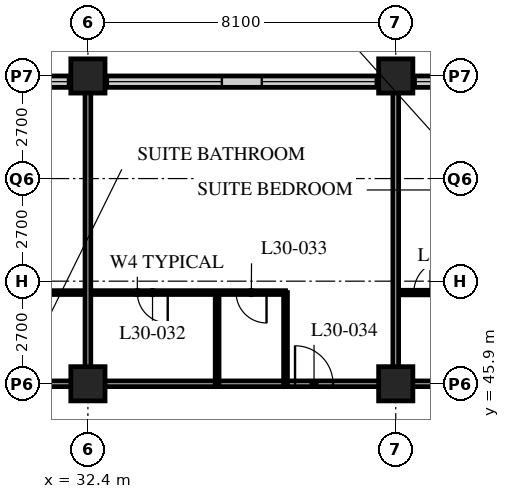
"""IFC4 building model, lengths in metres.
Left out: names, types, materials, properties, quantities, classifications, styles, units other than length and angle.
Written with IfcOpenShell. Run it as: python <this file> out.ifc"""

import sys

from ifc_helpers import new_model, si_unit, direction, frame, frame_2d, origin, origin_2d, place, context, subcontext, project, spatial, rectangle, hollow_rectangle, extrude, element, fill, save


model = new_model("IFC4")
c1 = context("Model", 3, precision=1e-05, world=origin(), true_north=direction((0.0, 1.0)))
c2 = subcontext(c1, "Body", "Model", "MODEL_VIEW")
j1 = project(units=[si_unit("LENGTHUNIT", "METRE"), si_unit("PLANEANGLEUNIT", "RADIAN")], contexts=[c1])
p1 = place(None, origin())
s1 = spatial("IfcSite", under=j1, at=p1, CompositionType="ELEMENT")
p2 = place(p1, origin())
s2 = spatial("IfcBuilding", under=s1, at=p2, CompositionType="ELEMENT")
p3 = place(p2, frame((0.0, 0.0, 120.4)))
s3 = spatial("IfcBuildingStorey", under=s2, at=p3, CompositionType="ELEMENT", Elevation=120.4)
for number, where, z_axis, x_axis in (
    (1, (32.4, 45.9, 0.0), (0.0, 0.0, 1.0), (1.0, 0.0, 0.0)),
    (2, (32.4, 54.0, 0.0), (0.0, 0.0, 1.0), (1.0, 0.0, 0.0)),
    (3, (40.5, 45.9, 0.0), (0.0, 0.0, 1.0), (1.0, 0.0, 0.0)),
    (4, (40.5, 54.0, 0.0), (0.0, 0.0, 1.0), (1.0, 0.0, 0.0)),
):
    element("IfcColumn", number, at=place(p3, frame(where, z_axis=z_axis, x_axis=x_axis)), inside=s3, PredefinedType="COLUMN", context=c2, shape_type="SweptSolid", body=[
        extrude(hollow_rectangle(XDim=0.9, YDim=0.9, WallThickness=0.09, at=origin_2d()), origin(), (0.0, 0.0, 1.0), 3.4),
    ])
p4 = place(p3, frame((48.3, 53.85, 0.0), z_axis=(0.0, 0.0, 1.0), x_axis=(-1.0, 0.0, 0.0)))
e5 = element("IfcWall", 5, at=p4, inside=s3, PredefinedType="SOLIDWALL", context=c2, shape_type="SweptSolid", body=[
    extrude(rectangle(XDim=40.2, YDim=0.3, at=frame_2d((20.1, 0.0))), origin(), (0.0, 0.0, 1.0), 3.19),
])
p5 = place(p4, frame((0.225, 0.0, 0.9)))
e6 = element("IfcOpeningElement", 6, at=p5, cuts=e5, PredefinedType="OPENING", context=c2, shape_type="SweptSolid", body=[
    extrude(rectangle(XDim=3.0, YDim=2.0, at=frame_2d((1.5, 1.0))), frame((0.0, 0.16, 0.0), z_axis=(0.0, -1.0, 0.0), x_axis=(1.0, 0.0, 0.0)), (0.0, 0.0, 1.0), 0.32),
])
p6 = place(p4, frame((4.275, 0.0, 0.9)))
e7 = element("IfcOpeningElement", 7, at=p6, cuts=e5, PredefinedType="OPENING", context=c2, shape_type="SweptSolid", body=[
    extrude(rectangle(XDim=3.0, YDim=2.0, at=frame_2d((1.5, 1.0))), frame((0.0, 0.16, 0.0), z_axis=(0.0, -1.0, 0.0), x_axis=(1.0, 0.0, 0.0)), (0.0, 0.0, 1.0), 0.32),
])
p7 = place(p4, frame((8.325, 0.0, 0.9)))
e8 = element("IfcOpeningElement", 8, at=p7, cuts=e5, PredefinedType="OPENING", context=c2, shape_type="SweptSolid", body=[
    extrude(rectangle(XDim=3.0, YDim=2.0, at=frame_2d((1.5, 1.0))), frame((0.0, 0.16, 0.0), z_axis=(0.0, -1.0, 0.0), x_axis=(1.0, 0.0, 0.0)), (0.0, 0.0, 1.0), 0.32),
])
p8 = place(p4, frame((12.375, 0.0, 0.9)))
e9 = element("IfcOpeningElement", 9, at=p8, cuts=e5, PredefinedType="OPENING", context=c2, shape_type="SweptSolid", body=[
    extrude(rectangle(XDim=3.0, YDim=2.0, at=frame_2d((1.5, 1.0))), frame((0.0, 0.16, 0.0), z_axis=(0.0, -1.0, 0.0), x_axis=(1.0, 0.0, 0.0)), (0.0, 0.0, 1.0), 0.32),
])
p9 = place(p4, frame((16.425, 0.0, 0.9)))
e10 = element("IfcOpeningElement", 10, at=p9, cuts=e5, PredefinedType="OPENING", context=c2, shape_type="SweptSolid", body=[
    extrude(rectangle(XDim=3.0, YDim=2.0, at=frame_2d((1.5, 1.0))), frame((0.0, 0.16, 0.0), z_axis=(0.0, -1.0, 0.0), x_axis=(1.0, 0.0, 0.0)), (0.0, 0.0, 1.0), 0.32),
])
p10 = place(p4, frame((20.475, 0.0, 0.9)))
e11 = element("IfcOpeningElement", 11, at=p10, cuts=e5, PredefinedType="OPENING", context=c2, shape_type="SweptSolid", body=[
    extrude(rectangle(XDim=3.0, YDim=2.0, at=frame_2d((1.5, 1.0))), frame((0.0, 0.16, 0.0), z_axis=(0.0, -1.0, 0.0), x_axis=(1.0, 0.0, 0.0)), (0.0, 0.0, 1.0), 0.32),
])
p11 = place(p4, frame((24.525, 0.0, 0.9)))
e12 = element("IfcOpeningElement", 12, at=p11, cuts=e5, PredefinedType="OPENING", context=c2, shape_type="SweptSolid", body=[
    extrude(rectangle(XDim=3.0, YDim=2.0, at=frame_2d((1.5, 1.0))), frame((0.0, 0.16, 0.0), z_axis=(0.0, -1.0, 0.0), x_axis=(1.0, 0.0, 0.0)), (0.0, 0.0, 1.0), 0.32),
])
p12 = place(p4, frame((28.575, 0.0, 0.9)))
e13 = element("IfcOpeningElement", 13, at=p12, cuts=e5, PredefinedType="OPENING", context=c2, shape_type="SweptSolid", body=[
    extrude(rectangle(XDim=3.0, YDim=2.0, at=frame_2d((1.5, 1.0))), frame((0.0, 0.16, 0.0), z_axis=(0.0, -1.0, 0.0), x_axis=(1.0, 0.0, 0.0)), (0.0, 0.0, 1.0), 0.32),
])
p13 = place(p4, frame((32.625, 0.0, 0.9)))
e14 = element("IfcOpeningElement", 14, at=p13, cuts=e5, PredefinedType="OPENING", context=c2, shape_type="SweptSolid", body=[
    extrude(rectangle(XDim=3.0, YDim=2.0, at=frame_2d((1.5, 1.0))), frame((0.0, 0.16, 0.0), z_axis=(0.0, -1.0, 0.0), x_axis=(1.0, 0.0, 0.0)), (0.0, 0.0, 1.0), 0.32),
])
p14 = place(p4, frame((36.675, 0.0, 0.9)))
e15 = element("IfcOpeningElement", 15, at=p14, cuts=e5, PredefinedType="OPENING", context=c2, shape_type="SweptSolid", body=[
    extrude(rectangle(XDim=3.0, YDim=2.0, at=frame_2d((1.5, 1.0))), frame((0.0, 0.16, 0.0), z_axis=(0.0, -1.0, 0.0), x_axis=(1.0, 0.0, 0.0)), (0.0, 0.0, 1.0), 0.32),
])
p15 = place(p3, frame((12.15, 45.9, 0.0), z_axis=(0.0, 0.0, 1.0), x_axis=(1.0, 0.0, 0.0)))
e16 = element("IfcWall", 16, at=p15, inside=s3, PredefinedType="PARTITIONING", context=c2, shape_type="SweptSolid", body=[
    extrude(rectangle(XDim=32.4, YDim=0.15, at=frame_2d((16.2, 0.0))), origin(), (0.0, 0.0, 1.0), 2.578),
])
p16 = place(p15, frame((5.95, 0.0, 0.0)))
e17 = element("IfcOpeningElement", 17, at=p16, cuts=e16, PredefinedType="OPENING", context=c2, shape_type="SweptSolid", body=[
    extrude(rectangle(XDim=1.0, YDim=2.1, at=frame_2d((0.5, 1.05))), frame((0.0, 0.085, 0.0), z_axis=(0.0, -1.0, 0.0), x_axis=(1.0, 0.0, 0.0)), (0.0, 0.0, 1.0), 0.17),
])
p17 = place(p15, frame((14.05, 0.0, 0.0)))
e18 = element("IfcOpeningElement", 18, at=p17, cuts=e16, PredefinedType="OPENING", context=c2, shape_type="SweptSolid", body=[
    extrude(rectangle(XDim=1.0, YDim=2.1, at=frame_2d((0.5, 1.05))), frame((0.0, 0.085, 0.0), z_axis=(0.0, -1.0, 0.0), x_axis=(1.0, 0.0, 0.0)), (0.0, 0.0, 1.0), 0.17),
])
p18 = place(p15, frame((25.7, 0.0, 0.0)))
e19 = element("IfcOpeningElement", 19, at=p18, cuts=e16, PredefinedType="OPENING", context=c2, shape_type="SweptSolid", body=[
    extrude(rectangle(XDim=1.0, YDim=2.1, at=frame_2d((0.5, 1.05))), frame((0.0, 0.085, 0.0), z_axis=(0.0, -1.0, 0.0), x_axis=(1.0, 0.0, 0.0)), (0.0, 0.0, 1.0), 0.17),
])
p19 = place(p15, frame((29.875, 0.0, 0.0)))
e20 = element("IfcOpeningElement", 20, at=p19, cuts=e16, PredefinedType="OPENING", context=c2, shape_type="SweptSolid", body=[
    extrude(rectangle(XDim=1.0, YDim=2.1, at=frame_2d((0.5, 1.05))), frame((0.0, 0.085, 0.0), z_axis=(0.0, -1.0, 0.0), x_axis=(1.0, 0.0, 0.0)), (0.0, 0.0, 1.0), 0.17),
])
p20 = place(p15, frame((1.525, 0.0, 0.0)))
e21 = element("IfcOpeningElement", 21, at=p20, cuts=e16, PredefinedType="OPENING", context=c2, shape_type="SweptSolid", body=[
    extrude(rectangle(XDim=1.0, YDim=2.1, at=frame_2d((0.5, 1.05))), frame((0.0, 0.085, 0.0), z_axis=(0.0, -1.0, 0.0), x_axis=(1.0, 0.0, 0.0)), (0.0, 0.0, 1.0), 0.17),
])
p21 = place(p3, frame((29.8, 48.3, 0.0), z_axis=(0.0, 0.0, 1.0), x_axis=(1.0, 0.0, 0.0)))
e22 = element("IfcWall", 22, at=p21, inside=s3, PredefinedType="PARTITIONING", context=c2, shape_type="SweptSolid", body=[
    extrude(rectangle(XDim=7.8, YDim=0.1, at=frame_2d((3.9, 0.0))), origin(), (0.0, 0.0, 1.0), 3.19),
])
p22 = place(p21, frame((3.9, 0.0, 0.0)))
e23 = element("IfcOpeningElement", 23, at=p22, cuts=e22, PredefinedType="OPENING", context=c2, shape_type="SweptSolid", body=[
    extrude(rectangle(XDim=0.8, YDim=2.1, at=frame_2d((0.4, 1.05))), frame((0.0, 0.06, 0.0), z_axis=(0.0, -1.0, 0.0), x_axis=(1.0, 0.0, 0.0)), (0.0, 0.0, 1.0), 0.12),
])
p23 = place(p21, frame((6.5, 0.0, 0.0)))
e24 = element("IfcOpeningElement", 24, at=p23, cuts=e22, PredefinedType="OPENING", context=c2, shape_type="SweptSolid", body=[
    extrude(rectangle(XDim=0.8, YDim=2.1, at=frame_2d((0.4, 1.05))), frame((0.0, 0.06, 0.0), z_axis=(0.0, -1.0, 0.0), x_axis=(1.0, 0.0, 0.0)), (0.0, 0.0, 1.0), 0.12),
])
p24 = place(p3, frame((32.4, 45.9, 0.0), z_axis=(0.0, 0.0, 1.0), x_axis=(0.0, 1.0, 0.0)))
e25 = element("IfcWall", 25, at=p24, inside=s3, PredefinedType="PARTITIONING", context=c2, shape_type="SweptSolid", body=[
    extrude(rectangle(XDim=7.8, YDim=0.15, at=frame_2d((3.9, 0.0))), origin(), (0.0, 0.0, 1.0), 2.578),
])
for number, where, z_axis, x_axis in (
    (26, (35.8, 45.9, 0.0), (0.0, 0.0, 1.0), (0.0, 1.0, 0.0)),
    (27, (37.6, 45.9, 0.0), (0.0, 0.0, 1.0), (0.0, 1.0, 0.0)),
):
    element("IfcWall", number, at=place(p3, frame(where, z_axis=z_axis, x_axis=x_axis)), inside=s3, PredefinedType="PARTITIONING", context=c2, shape_type="SweptSolid", body=[
        extrude(rectangle(XDim=2.4, YDim=0.1, at=frame_2d((1.2, 0.0))), origin(), (0.0, 0.0, 1.0), 3.19),
    ])
p25 = place(p3, frame((40.5, 48.3, 0.0), z_axis=(0.0, 0.0, 1.0), x_axis=(1.0, 0.0, 0.0)))
e28 = element("IfcWall", 28, at=p25, inside=s3, PredefinedType="PARTITIONING", context=c2, shape_type="SweptSolid", body=[
    extrude(rectangle(XDim=8.05, YDim=0.12, at=frame_2d((4.025, 0.0))), origin(), (0.0, 0.0, 1.0), 3.19),
])
p26 = place(p25, frame((0.475, 0.0, 0.0)))
e29 = element("IfcOpeningElement", 29, at=p26, cuts=e28, PredefinedType="OPENING", context=c2, shape_type="SweptSolid", body=[
    extrude(rectangle(XDim=0.85, YDim=2.1, at=frame_2d((0.425, 1.05))), frame((0.0, 0.07, 0.0), z_axis=(0.0, -1.0, 0.0), x_axis=(1.0, 0.0, 0.0)), (0.0, 0.0, 1.0), 0.14),
])
p27 = place(p25, frame((4.325, 0.0, 0.0)))
e30 = element("IfcOpeningElement", 30, at=p27, cuts=e28, PredefinedType="OPENING", context=c2, shape_type="SweptSolid", body=[
    extrude(rectangle(XDim=0.85, YDim=2.1, at=frame_2d((0.425, 1.05))), frame((0.0, 0.07, 0.0), z_axis=(0.0, -1.0, 0.0), x_axis=(1.0, 0.0, 0.0)), (0.0, 0.0, 1.0), 0.14),
])
p28 = place(p3, frame((40.5, 45.9, 0.0), z_axis=(0.0, 0.0, 1.0), x_axis=(0.0, 1.0, 0.0)))
e31 = element("IfcWall", 31, at=p28, inside=s3, PredefinedType="PARTITIONING", context=c2, shape_type="SweptSolid", body=[
    extrude(rectangle(XDim=7.8, YDim=0.15, at=frame_2d((3.9, 0.0))), origin(), (0.0, 0.0, 1.0), 2.578),
])
p29 = place(p6, origin())
e32 = element("IfcWindow", 32, at=p29, inside=s3, PartitioningType="SINGLE_PANEL", PredefinedType="WINDOW", context=c2, shape_type="SweptSolid", body=[
    extrude(rectangle(XDim=3.0, YDim=2.0, at=frame_2d((1.5, 1.0))), frame((0.0, 0.03, 0.0), z_axis=(0.0, -1.0, 0.0), x_axis=(1.0, 0.0, 0.0)), (0.0, 0.0, 1.0), 0.06),
])
fill(e7, e32)
p30 = place(p7, origin())
e33 = element("IfcWindow", 33, at=p30, inside=s3, PartitioningType="SINGLE_PANEL", PredefinedType="WINDOW", context=c2, shape_type="SweptSolid", body=[
    extrude(rectangle(XDim=3.0, YDim=2.0, at=frame_2d((1.5, 1.0))), frame((0.0, 0.03, 0.0), z_axis=(0.0, -1.0, 0.0), x_axis=(1.0, 0.0, 0.0)), (0.0, 0.0, 1.0), 0.06),
])
fill(e8, e33)
p31 = place(p8, origin())
e34 = element("IfcWindow", 34, at=p31, inside=s3, PartitioningType="SINGLE_PANEL", PredefinedType="WINDOW", context=c2, shape_type="SweptSolid", body=[
    extrude(rectangle(XDim=3.0, YDim=2.0, at=frame_2d((1.5, 1.0))), frame((0.0, 0.03, 0.0), z_axis=(0.0, -1.0, 0.0), x_axis=(1.0, 0.0, 0.0)), (0.0, 0.0, 1.0), 0.06),
])
fill(e9, e34)
p32 = place(p9, origin())
e35 = element("IfcWindow", 35, at=p32, inside=s3, PartitioningType="SINGLE_PANEL", PredefinedType="WINDOW", context=c2, shape_type="SweptSolid", body=[
    extrude(rectangle(XDim=3.0, YDim=2.0, at=frame_2d((1.5, 1.0))), frame((0.0, 0.03, 0.0), z_axis=(0.0, -1.0, 0.0), x_axis=(1.0, 0.0, 0.0)), (0.0, 0.0, 1.0), 0.06),
])
fill(e10, e35)
p33 = place(p22, origin())
e36 = element("IfcDoor", 36, at=p33, inside=s3, OperationType="SINGLE_SWING_LEFT", PredefinedType="DOOR", context=c2, shape_type="SweptSolid", body=[
    extrude(rectangle(XDim=0.8, YDim=2.1, at=frame_2d((0.4, 1.05))), frame((0.0, 0.025, 0.0), z_axis=(0.0, -1.0, 0.0), x_axis=(1.0, 0.0, 0.0)), (0.0, 0.0, 1.0), 0.05),
])
fill(e23, e36)
p34 = place(p23, origin())
e37 = element("IfcDoor", 37, at=p34, inside=s3, OperationType="SINGLE_SWING_LEFT", PredefinedType="DOOR", context=c2, shape_type="SweptSolid", body=[
    extrude(rectangle(XDim=0.8, YDim=2.1, at=frame_2d((0.4, 1.05))), frame((0.0, 0.025, 0.0), z_axis=(0.0, -1.0, 0.0), x_axis=(1.0, 0.0, 0.0)), (0.0, 0.0, 1.0), 0.05),
])
fill(e24, e37)
p35 = place(p18, origin())
e38 = element("IfcDoor", 38, at=p35, inside=s3, OperationType="SINGLE_SWING_LEFT", PredefinedType="DOOR", context=c2, shape_type="SweptSolid", body=[
    extrude(rectangle(XDim=1.0, YDim=2.1, at=frame_2d((0.5, 1.05))), frame((0.0, 0.025, 0.0), z_axis=(0.0, -1.0, 0.0), x_axis=(1.0, 0.0, 0.0)), (0.0, 0.0, 1.0), 0.05),
])
fill(e19, e38)
p36 = place(p26, origin())
e39 = element("IfcDoor", 39, at=p36, inside=s3, OperationType="SINGLE_SWING_RIGHT", PredefinedType="DOOR", context=c2, shape_type="SweptSolid", body=[
    extrude(rectangle(XDim=0.85, YDim=2.1, at=frame_2d((0.425, 1.05))), frame((0.0, 0.025, 0.0), z_axis=(0.0, -1.0, 0.0), x_axis=(1.0, 0.0, 0.0)), (0.0, 0.0, 1.0), 0.05),
])
fill(e29, e39)
save(model, sys.argv[1])
